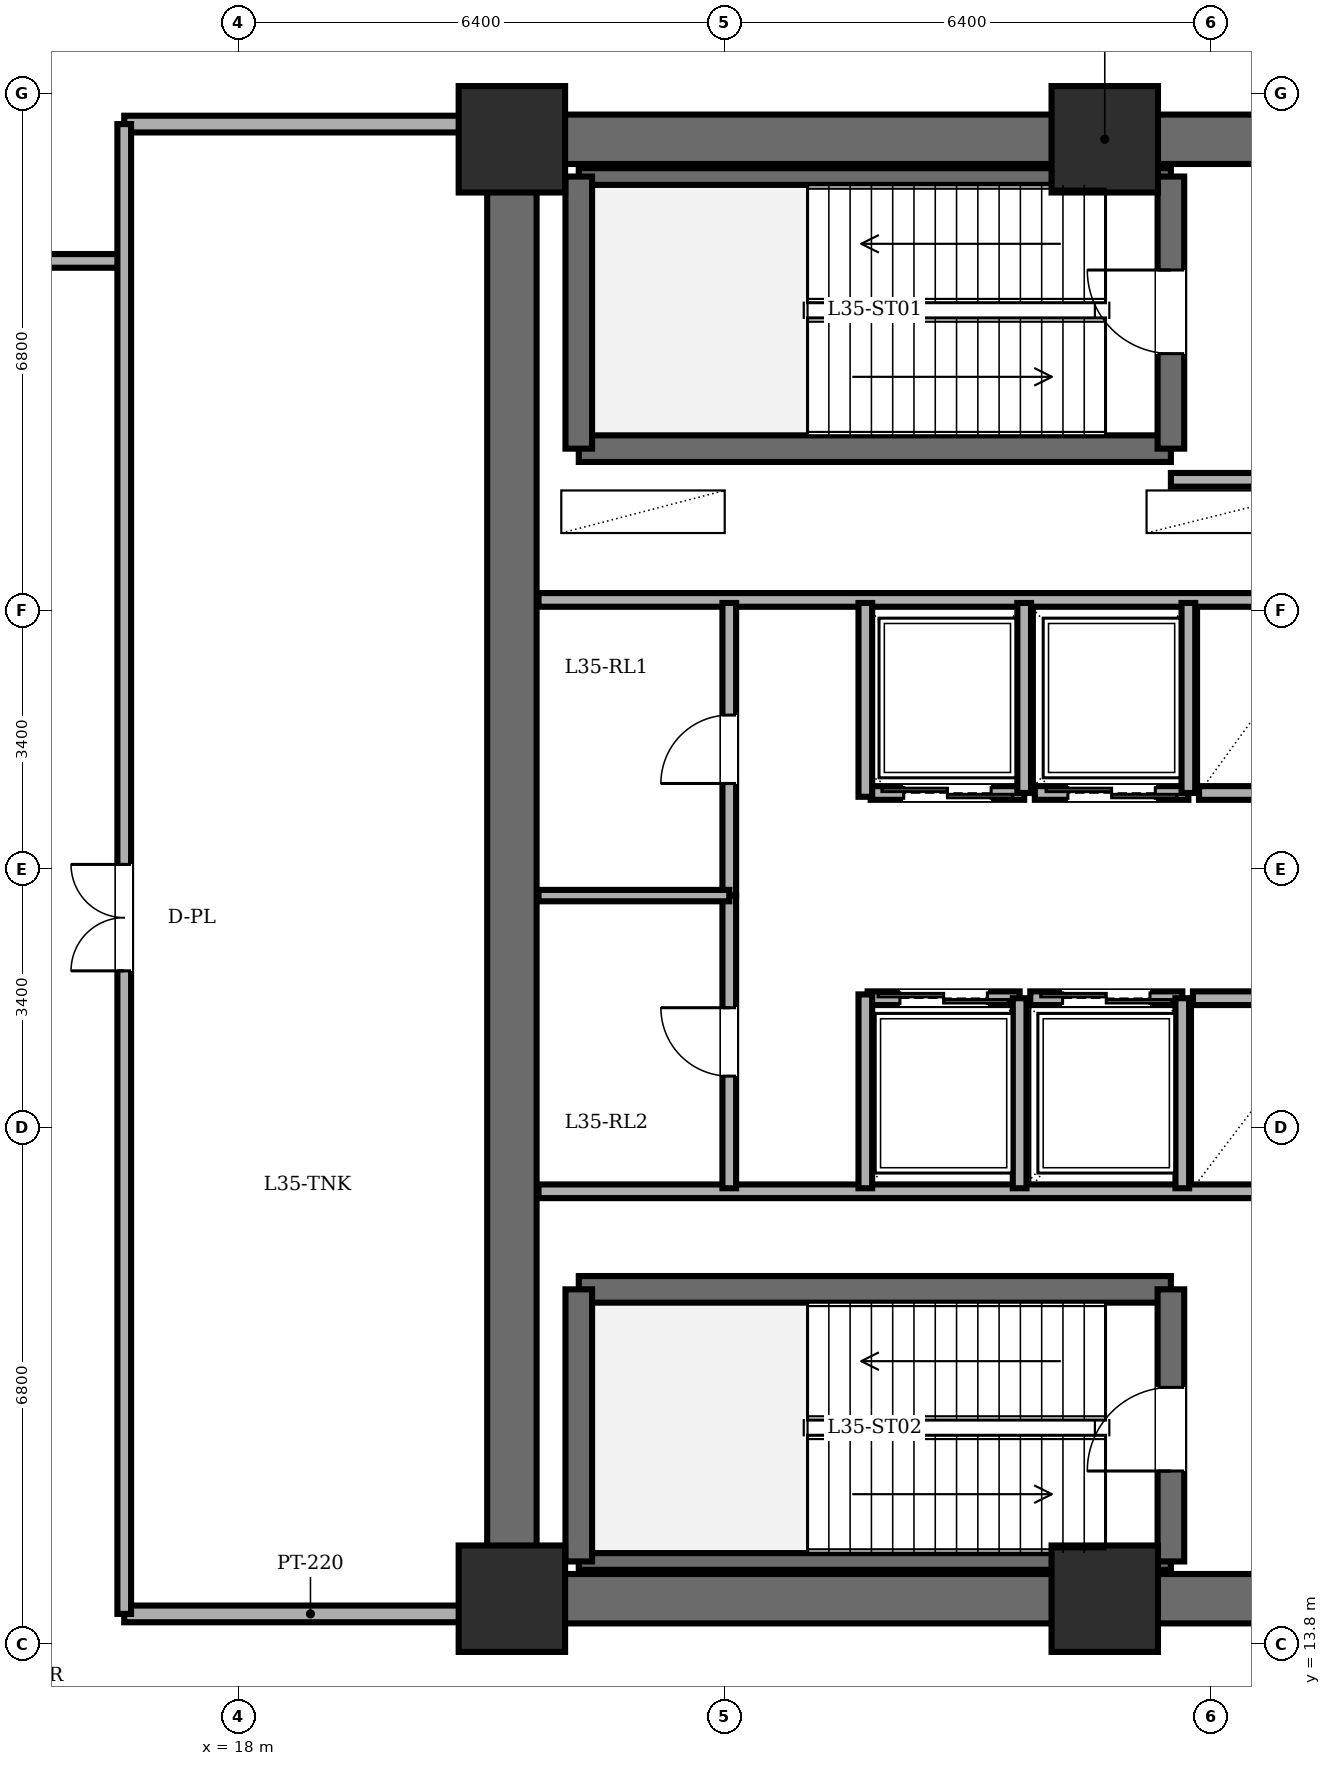
"""IFC4 building model, lengths in metres.
Left out: names, types, materials, properties, quantities, classifications, styles, units other than length and angle.
Written with IfcOpenShell. Run it as: python <this file> out.ifc"""

import sys

from ifc_helpers import new_model, si_unit, direction, frame, frame_2d, origin, origin_2d, place, context, subcontext, project, spatial, rectangle, extrude, element, fill, save


model = new_model("IFC4")
c1 = context("Model", 3, precision=1e-05, world=origin(), true_north=direction((0.0, 1.0)))
c2 = subcontext(c1, "Body", "Model", "MODEL_VIEW")
j1 = project(units=[si_unit("LENGTHUNIT", "METRE"), si_unit("PLANEANGLEUNIT", "RADIAN")], contexts=[c1])
p1 = place(None, origin())
s1 = spatial("IfcSite", under=j1, at=p1, CompositionType="ELEMENT")
p2 = place(p1, origin())
s2 = spatial("IfcBuilding", under=s1, at=p2, CompositionType="ELEMENT")
p3 = place(p2, frame((0.0, 0.0, 133.1)))
s3 = spatial("IfcBuildingStorey", under=s2, at=p3, CompositionType="ELEMENT", Elevation=133.1)
for number, where, z_axis, x_axis in (
    (1, (21.6, 14.4, 0.0), (0.0, 0.0, 1.0), (1.0, 0.0, 0.0)),
    (2, (29.4, 14.4, 0.0), (0.0, 0.0, 1.0), (1.0, 0.0, 0.0)),
    (3, (29.4, 33.6, 0.0), (0.0, 0.0, 1.0), (1.0, 0.0, 0.0)),
    (4, (21.6, 33.6, 0.0), (0.0, 0.0, 1.0), (1.0, 0.0, 0.0)),
):
    element("IfcColumn", number, at=place(p3, frame(where, z_axis=z_axis, x_axis=x_axis)), inside=s3, PredefinedType="COLUMN", context=c2, shape_type="SweptSolid", body=[
        extrude(rectangle(XDim=1.4, YDim=1.4, at=origin_2d()), origin(), (0.0, 0.0, 1.0), 5.6),
    ])
p4 = place(p3, frame((21.6, 14.4, 0.0), z_axis=(0.0, 0.0, 1.0), x_axis=(0.0, 1.0, 0.0)))
e5 = element("IfcWall", 5, at=p4, inside=s3, PredefinedType="SHEAR", context=c2, shape_type="SweptSolid", body=[
    extrude(rectangle(XDim=19.2, YDim=0.65, at=frame_2d((9.6, 0.0))), origin(), (0.0, 0.0, 1.0), 5.36),
])
for number, where, z_axis, x_axis in (
    (6, (21.6, 33.6, 0.0), (0.0, 0.0, 1.0), (1.0, 0.0, 0.0)),
    (7, (37.2, 14.4, 0.0), (0.0, 0.0, 1.0), (-1.0, 0.0, 0.0)),
):
    element("IfcWall", number, at=place(p3, frame(where, z_axis=z_axis, x_axis=x_axis)), inside=s3, PredefinedType="SHEAR", context=c2, shape_type="SweptSolid", body=[
        extrude(rectangle(XDim=15.6, YDim=0.65, at=frame_2d((7.8, 0.0))), origin(), (0.0, 0.0, 1.0), 5.36),
    ])
p5 = place(p3, frame((22.48, 29.53, 0.0), z_axis=(0.0, 0.0, 1.0), x_axis=(1.0, 0.0, 0.0)))
e8 = element("IfcWall", 8, at=p5, inside=s3, PredefinedType="SOLIDWALL", context=c2, shape_type="SweptSolid", body=[
    extrude(rectangle(XDim=7.79, YDim=0.35, at=frame_2d((3.895, 0.0))), origin(), (0.0, 0.0, 1.0), 5.36),
])
p6 = place(p3, frame((22.48, 33.11, 0.0), z_axis=(0.0, 0.0, 1.0), x_axis=(1.0, 0.0, 0.0)))
e9 = element("IfcWall", 9, at=p6, inside=s3, PredefinedType="PARTITIONING", context=c2, shape_type="SweptSolid", body=[
    extrude(rectangle(XDim=7.79, YDim=0.22, at=frame_2d((3.895, 0.0))), origin(), (0.0, 0.0, 1.0), 5.36),
])
p7 = place(p3, frame((22.48, 29.53, 0.0), z_axis=(0.0, 0.0, 1.0), x_axis=(0.0, 1.0, 0.0)))
e10 = element("IfcWall", 10, at=p7, inside=s3, PredefinedType="SOLIDWALL", context=c2, shape_type="SweptSolid", body=[
    extrude(rectangle(XDim=3.58, YDim=0.35, at=frame_2d((1.79, 0.0))), origin(), (0.0, 0.0, 1.0), 5.36),
])
p8 = place(p3, frame((30.27, 29.53, 0.0), z_axis=(0.0, 0.0, 1.0), x_axis=(0.0, 1.0, 0.0)))
e11 = element("IfcWall", 11, at=p8, inside=s3, PredefinedType="SOLIDWALL", context=c2, shape_type="SweptSolid", body=[
    extrude(rectangle(XDim=3.58, YDim=0.35, at=frame_2d((1.79, 0.0))), origin(), (0.0, 0.0, 1.0), 5.36),
])
p9 = place(p8, frame((1.25, 0.0, 0.0)))
e12 = element("IfcOpeningElement", 12, at=p9, cuts=e11, PredefinedType="OPENING", context=c2, shape_type="SweptSolid", body=[
    extrude(rectangle(XDim=1.1, YDim=2.15, at=frame_2d((0.55, 1.075))), frame((0.0, 0.185, 0.0), z_axis=(0.0, -1.0, 0.0), x_axis=(1.0, 0.0, 0.0)), (0.0, 0.0, 1.0), 0.37),
])
p10 = place(p3, frame((22.48, 18.47, 0.0), z_axis=(0.0, 0.0, 1.0), x_axis=(1.0, 0.0, 0.0)))
e13 = element("IfcWall", 13, at=p10, inside=s3, PredefinedType="SOLIDWALL", context=c2, shape_type="SweptSolid", body=[
    extrude(rectangle(XDim=7.79, YDim=0.35, at=frame_2d((3.895, 0.0))), origin(), (0.0, 0.0, 1.0), 5.36),
])
p11 = place(p3, frame((22.48, 14.89, 0.0), z_axis=(0.0, 0.0, 1.0), x_axis=(1.0, 0.0, 0.0)))
e14 = element("IfcWall", 14, at=p11, inside=s3, PredefinedType="PARTITIONING", context=c2, shape_type="SweptSolid", body=[
    extrude(rectangle(XDim=7.79, YDim=0.22, at=frame_2d((3.895, 0.0))), origin(), (0.0, 0.0, 1.0), 5.36),
])
p12 = place(p3, frame((22.48, 14.89, 0.0), z_axis=(0.0, 0.0, 1.0), x_axis=(0.0, 1.0, 0.0)))
e15 = element("IfcWall", 15, at=p12, inside=s3, PredefinedType="SOLIDWALL", context=c2, shape_type="SweptSolid", body=[
    extrude(rectangle(XDim=3.58, YDim=0.35, at=frame_2d((1.79, 0.0))), origin(), (0.0, 0.0, 1.0), 5.36),
])
p13 = place(p3, frame((30.27, 14.89, 0.0), z_axis=(0.0, 0.0, 1.0), x_axis=(0.0, 1.0, 0.0)))
e16 = element("IfcWall", 16, at=p13, inside=s3, PredefinedType="SOLIDWALL", context=c2, shape_type="SweptSolid", body=[
    extrude(rectangle(XDim=3.58, YDim=0.35, at=frame_2d((1.79, 0.0))), origin(), (0.0, 0.0, 1.0), 5.36),
])
p14 = place(p13, frame((1.19, 0.0, 0.0)))
e17 = element("IfcOpeningElement", 17, at=p14, cuts=e16, PredefinedType="OPENING", context=c2, shape_type="SweptSolid", body=[
    extrude(rectangle(XDim=1.1, YDim=2.15, at=frame_2d((0.55, 1.075))), frame((0.0, 0.185, 0.0), z_axis=(0.0, -1.0, 0.0), x_axis=(1.0, 0.0, 0.0)), (0.0, 0.0, 1.0), 0.37),
])
p15 = place(p3, frame((30.27, 29.12, 0.0), z_axis=(0.0, 0.0, 1.0), x_axis=(1.0, 0.0, 0.0)))
e18 = element("IfcWall", 18, at=p15, inside=s3, PredefinedType="PARTITIONING", context=c2, shape_type="SweptSolid", body=[
    extrude(rectangle(XDim=2.24, YDim=0.18, at=frame_2d((1.12, 0.0))), origin(), (0.0, 0.0, 1.0), 5.36),
])
p16 = place(p3, frame((21.95, 27.54, 0.0), z_axis=(0.0, 0.0, 1.0), x_axis=(1.0, 0.0, 0.0)))
e19 = element("IfcWall", 19, at=p16, inside=s3, PredefinedType="PARTITIONING", context=c2, shape_type="SweptSolid", body=[
    extrude(rectangle(XDim=10.56, YDim=0.18, at=frame_2d((5.28, 0.0))), origin(), (0.0, 0.0, 1.0), 5.36),
])
p17 = place(p3, frame((21.95, 19.76, 0.0), z_axis=(0.0, 0.0, 1.0), x_axis=(1.0, 0.0, 0.0)))
e20 = element("IfcWall", 20, at=p17, inside=s3, PredefinedType="PARTITIONING", context=c2, shape_type="SweptSolid", body=[
    extrude(rectangle(XDim=14.87, YDim=0.18, at=frame_2d((7.435, 0.0))), origin(), (0.0, 0.0, 1.0), 5.36),
])
p18 = place(p3, frame((28.34, 25.0, 0.0), z_axis=(0.0, 0.0, 1.0), x_axis=(-1.0, 0.0, 0.0)))
e21 = element("IfcWall", 21, at=p18, inside=s3, PredefinedType="PARTITIONING", context=c2, shape_type="SweptSolid", body=[
    extrude(rectangle(XDim=2.02, YDim=0.18, at=frame_2d((1.01, 0.0))), origin(), (0.0, 0.0, 1.0), 5.36),
])
p19 = place(p18, frame((0.435, 0.0, 0.0)))
e22 = element("IfcOpeningElement", 22, at=p19, cuts=e21, PredefinedType="OPENING", context=c2, shape_type="SweptSolid", body=[
    extrude(rectangle(XDim=1.15, YDim=2.2, at=frame_2d((0.575, 1.1))), frame((0.0, 0.1, 0.0), z_axis=(0.0, -1.0, 0.0), x_axis=(1.0, 0.0, 0.0)), (0.0, 0.0, 1.0), 0.2),
])
p20 = place(p3, frame((28.34, 25.0, 0.0), z_axis=(0.0, 0.0, 1.0), x_axis=(0.0, 1.0, 0.0)))
e23 = element("IfcWall", 23, at=p20, inside=s3, PredefinedType="PARTITIONING", context=c2, shape_type="SweptSolid", body=[
    extrude(rectangle(XDim=2.5, YDim=0.18, at=frame_2d((1.25, 0.0))), origin(), (0.0, 0.0, 1.0), 5.36),
])
p21 = place(p3, frame((30.5, 25.0, 0.0), z_axis=(0.0, 0.0, 1.0), x_axis=(-1.0, 0.0, 0.0)))
e24 = element("IfcWall", 24, at=p21, inside=s3, PredefinedType="PARTITIONING", context=c2, shape_type="SweptSolid", body=[
    extrude(rectangle(XDim=2.02, YDim=0.18, at=frame_2d((1.01, 0.0))), origin(), (0.0, 0.0, 1.0), 5.36),
])
p22 = place(p21, frame((0.435, 0.0, 0.0)))
e25 = element("IfcOpeningElement", 25, at=p22, cuts=e24, PredefinedType="OPENING", context=c2, shape_type="SweptSolid", body=[
    extrude(rectangle(XDim=1.15, YDim=2.2, at=frame_2d((0.575, 1.1))), frame((0.0, 0.1, 0.0), z_axis=(0.0, -1.0, 0.0), x_axis=(1.0, 0.0, 0.0)), (0.0, 0.0, 1.0), 0.2),
])
p23 = place(p3, frame((30.5, 25.0, 0.0), z_axis=(0.0, 0.0, 1.0), x_axis=(0.0, 1.0, 0.0)))
e26 = element("IfcWall", 26, at=p23, inside=s3, PredefinedType="PARTITIONING", context=c2, shape_type="SweptSolid", body=[
    extrude(rectangle(XDim=2.5, YDim=0.18, at=frame_2d((1.25, 0.0))), origin(), (0.0, 0.0, 1.0), 5.36),
])
p24 = place(p3, frame((26.28, 22.3, 0.0), z_axis=(0.0, 0.0, 1.0), x_axis=(1.0, 0.0, 0.0)))
e27 = element("IfcWall", 27, at=p24, inside=s3, PredefinedType="PARTITIONING", context=c2, shape_type="SweptSolid", body=[
    extrude(rectangle(XDim=2.0, YDim=0.18, at=frame_2d((1.0, 0.0))), origin(), (0.0, 0.0, 1.0), 5.36),
])
p25 = place(p24, frame((0.425, 0.0, 0.0)))
e28 = element("IfcOpeningElement", 28, at=p25, cuts=e27, PredefinedType="OPENING", context=c2, shape_type="SweptSolid", body=[
    extrude(rectangle(XDim=1.15, YDim=2.2, at=frame_2d((0.575, 1.1))), frame((0.0, 0.1, 0.0), z_axis=(0.0, -1.0, 0.0), x_axis=(1.0, 0.0, 0.0)), (0.0, 0.0, 1.0), 0.2),
])
p26 = place(p3, frame((28.28, 19.8, 0.0), z_axis=(0.0, 0.0, 1.0), x_axis=(0.0, 1.0, 0.0)))
e29 = element("IfcWall", 29, at=p26, inside=s3, PredefinedType="PARTITIONING", context=c2, shape_type="SweptSolid", body=[
    extrude(rectangle(XDim=2.5, YDim=0.18, at=frame_2d((1.25, 0.0))), origin(), (0.0, 0.0, 1.0), 5.36),
])
p27 = place(p3, frame((28.42, 22.3, 0.0), z_axis=(0.0, 0.0, 1.0), x_axis=(1.0, 0.0, 0.0)))
e30 = element("IfcWall", 30, at=p27, inside=s3, PredefinedType="PARTITIONING", context=c2, shape_type="SweptSolid", body=[
    extrude(rectangle(XDim=2.0, YDim=0.18, at=frame_2d((1.0, 0.0))), origin(), (0.0, 0.0, 1.0), 5.36),
])
p28 = place(p27, frame((0.425, 0.0, 0.0)))
e31 = element("IfcOpeningElement", 31, at=p28, cuts=e30, PredefinedType="OPENING", context=c2, shape_type="SweptSolid", body=[
    extrude(rectangle(XDim=1.15, YDim=2.2, at=frame_2d((0.575, 1.1))), frame((0.0, 0.1, 0.0), z_axis=(0.0, -1.0, 0.0), x_axis=(1.0, 0.0, 0.0)), (0.0, 0.0, 1.0), 0.2),
])
p29 = place(p3, frame((30.42, 19.8, 0.0), z_axis=(0.0, 0.0, 1.0), x_axis=(0.0, 1.0, 0.0)))
e32 = element("IfcWall", 32, at=p29, inside=s3, PredefinedType="PARTITIONING", context=c2, shape_type="SweptSolid", body=[
    extrude(rectangle(XDim=2.5, YDim=0.18, at=frame_2d((1.25, 0.0))), origin(), (0.0, 0.0, 1.0), 5.36),
])
p30 = place(p3, frame((32.46, 25.0, 0.0), z_axis=(0.0, 0.0, 1.0), x_axis=(-1.0, 0.0, 0.0)))
e33 = element("IfcWall", 33, at=p30, inside=s3, PredefinedType="PARTITIONING", context=c2, shape_type="SweptSolid", body=[
    extrude(rectangle(XDim=1.82, YDim=0.18, at=frame_2d((0.91, 0.0))), origin(), (0.0, 0.0, 1.0), 5.36),
])
p31 = place(p3, frame((30.56, 22.3, 0.0), z_axis=(0.0, 0.0, 1.0), x_axis=(1.0, 0.0, 0.0)))
e34 = element("IfcWall", 34, at=p31, inside=s3, PredefinedType="PARTITIONING", context=c2, shape_type="SweptSolid", body=[
    extrude(rectangle(XDim=1.9, YDim=0.18, at=frame_2d((0.95, 0.0))), origin(), (0.0, 0.0, 1.0), 5.36),
])
p32 = place(p3, frame((24.46, 23.65, 0.0), z_axis=(0.0, 0.0, 1.0), x_axis=(0.0, 1.0, 0.0)))
e35 = element("IfcWall", 35, at=p32, inside=s3, PredefinedType="PARTITIONING", context=c2, shape_type="SweptSolid", body=[
    extrude(rectangle(XDim=3.85, YDim=0.18, at=frame_2d((1.925, 0.0))), origin(), (0.0, 0.0, 1.0), 5.36),
])
p33 = place(p32, frame((1.475, 0.0, 0.0)))
e36 = element("IfcOpeningElement", 36, at=p33, cuts=e35, PredefinedType="OPENING", context=c2, shape_type="SweptSolid", body=[
    extrude(rectangle(XDim=0.9, YDim=2.05, at=frame_2d((0.45, 1.025))), frame((0.0, 0.1, 0.0), z_axis=(0.0, -1.0, 0.0), x_axis=(1.0, 0.0, 0.0)), (0.0, 0.0, 1.0), 0.2),
])
p34 = place(p3, frame((24.46, 19.8, 0.0), z_axis=(0.0, 0.0, 1.0), x_axis=(0.0, 1.0, 0.0)))
e37 = element("IfcWall", 37, at=p34, inside=s3, PredefinedType="PARTITIONING", context=c2, shape_type="SweptSolid", body=[
    extrude(rectangle(XDim=3.85, YDim=0.18, at=frame_2d((1.925, 0.0))), origin(), (0.0, 0.0, 1.0), 5.36),
])
p35 = place(p34, frame((1.475, 0.0, 0.0)))
e38 = element("IfcOpeningElement", 38, at=p35, cuts=e37, PredefinedType="OPENING", context=c2, shape_type="SweptSolid", body=[
    extrude(rectangle(XDim=0.9, YDim=2.05, at=frame_2d((0.45, 1.025))), frame((0.0, 0.1, 0.0), z_axis=(0.0, -1.0, 0.0), x_axis=(1.0, 0.0, 0.0)), (0.0, 0.0, 1.0), 0.2),
])
p36 = place(p3, frame((21.95, 23.65, 0.0), z_axis=(0.0, 0.0, 1.0), x_axis=(1.0, 0.0, 0.0)))
e39 = element("IfcWall", 39, at=p36, inside=s3, PredefinedType="PARTITIONING", context=c2, shape_type="SweptSolid", body=[
    extrude(rectangle(XDim=2.51, YDim=0.15, at=frame_2d((1.255, 0.0))), origin(), (0.0, 0.0, 1.0), 5.36),
])
for number, where, z_axis, x_axis in (
    (40, (26.25, 24.95, 0.0), (0.0, 0.0, 1.0), (0.0, 1.0, 0.0)),
    (41, (26.25, 19.8, 0.0), (0.0, 0.0, 1.0), (0.0, 1.0, 0.0)),
):
    element("IfcWall", number, at=place(p3, frame(where, z_axis=z_axis, x_axis=x_axis)), inside=s3, PredefinedType="PARTITIONING", context=c2, shape_type="SweptSolid", body=[
        extrude(rectangle(XDim=2.55, YDim=0.18, at=frame_2d((1.275, 0.0))), origin(), (0.0, 0.0, 1.0), 5.36),
    ])
p37 = place(p3, frame((16.5, 14.2, 0.0), z_axis=(0.0, 0.0, 1.0), x_axis=(1.0, 0.0, 0.0)))
e42 = element("IfcWall", 42, at=p37, inside=s3, PredefinedType="PARTITIONING", context=c2, shape_type="SweptSolid", body=[
    extrude(rectangle(XDim=4.9, YDim=0.22, at=frame_2d((2.45, 0.0))), origin(), (0.0, 0.0, 1.0), 5.36),
])
p38 = place(p3, frame((13.5, 32.0, 0.0), z_axis=(0.0, 0.0, 1.0), x_axis=(1.0, 0.0, 0.0)))
e43 = element("IfcWall", 43, at=p38, inside=s3, PredefinedType="PARTITIONING", context=c2, shape_type="SweptSolid", body=[
    extrude(rectangle(XDim=3.0, YDim=0.18, at=frame_2d((1.5, 0.0))), origin(), (0.0, 0.0, 1.0), 5.36),
])
p39 = place(p3, frame((16.5, 33.8, 0.0), z_axis=(0.0, 0.0, 1.0), x_axis=(1.0, 0.0, 0.0)))
e44 = element("IfcWall", 44, at=p39, inside=s3, PredefinedType="PARTITIONING", context=c2, shape_type="SweptSolid", body=[
    extrude(rectangle(XDim=4.9, YDim=0.22, at=frame_2d((2.45, 0.0))), origin(), (0.0, 0.0, 1.0), 5.36),
])
p40 = place(p3, frame((16.5, 14.2, 0.0), z_axis=(0.0, 0.0, 1.0), x_axis=(0.0, 1.0, 0.0)))
e45 = element("IfcWall", 45, at=p40, inside=s3, PredefinedType="PARTITIONING", context=c2, shape_type="SweptSolid", body=[
    extrude(rectangle(XDim=19.6, YDim=0.18, at=frame_2d((9.8, 0.0))), origin(), (0.0, 0.0, 1.0), 5.36),
])
p41 = place(p40, frame((8.46, 0.0, 0.0)))
e46 = element("IfcOpeningElement", 46, at=p41, cuts=e45, PredefinedType="OPENING", context=c2, shape_type="SweptSolid", body=[
    extrude(rectangle(XDim=1.4, YDim=2.25, at=frame_2d((0.7, 1.125))), frame((0.0, 0.1, 0.0), z_axis=(0.0, -1.0, 0.0), x_axis=(1.0, 0.0, 0.0)), (0.0, 0.0, 1.0), 0.2),
])
p42 = place(p9, origin())
e47 = element("IfcDoor", 47, at=p42, inside=s3, OperationType="SINGLE_SWING_RIGHT", PredefinedType="DOOR", context=c2, shape_type="SweptSolid", body=[
    extrude(rectangle(XDim=1.1, YDim=2.15, at=frame_2d((0.55, 1.075))), frame((0.0, 0.025, 0.0), z_axis=(0.0, -1.0, 0.0), x_axis=(1.0, 0.0, 0.0)), (0.0, 0.0, 1.0), 0.05),
])
fill(e12, e47)
p43 = place(p14, origin())
e48 = element("IfcDoor", 48, at=p43, inside=s3, OperationType="SINGLE_SWING_LEFT", PredefinedType="DOOR", context=c2, shape_type="SweptSolid", body=[
    extrude(rectangle(XDim=1.1, YDim=2.15, at=frame_2d((0.55, 1.075))), frame((0.0, 0.025, 0.0), z_axis=(0.0, -1.0, 0.0), x_axis=(1.0, 0.0, 0.0)), (0.0, 0.0, 1.0), 0.05),
])
fill(e17, e48)
p44 = place(p19, origin())
e49 = element("IfcDoor", 49, at=p44, inside=s3, OperationType="DOUBLE_DOOR_SLIDING", PredefinedType="DOOR", context=c2, shape_type="SweptSolid", body=[
    extrude(rectangle(XDim=1.15, YDim=2.2, at=frame_2d((0.575, 1.1))), frame((0.0, 0.025, 0.0), z_axis=(0.0, -1.0, 0.0), x_axis=(1.0, 0.0, 0.0)), (0.0, 0.0, 1.0), 0.05),
])
fill(e22, e49)
p45 = place(p22, origin())
e50 = element("IfcDoor", 50, at=p45, inside=s3, OperationType="DOUBLE_DOOR_SLIDING", PredefinedType="DOOR", context=c2, shape_type="SweptSolid", body=[
    extrude(rectangle(XDim=1.15, YDim=2.2, at=frame_2d((0.575, 1.1))), frame((0.0, 0.025, 0.0), z_axis=(0.0, -1.0, 0.0), x_axis=(1.0, 0.0, 0.0)), (0.0, 0.0, 1.0), 0.05),
])
fill(e25, e50)
p46 = place(p25, origin())
e51 = element("IfcDoor", 51, at=p46, inside=s3, OperationType="DOUBLE_DOOR_SLIDING", PredefinedType="DOOR", context=c2, shape_type="SweptSolid", body=[
    extrude(rectangle(XDim=1.15, YDim=2.2, at=frame_2d((0.575, 1.1))), frame((0.0, 0.025, 0.0), z_axis=(0.0, -1.0, 0.0), x_axis=(1.0, 0.0, 0.0)), (0.0, 0.0, 1.0), 0.05),
])
fill(e28, e51)
p47 = place(p28, origin())
e52 = element("IfcDoor", 52, at=p47, inside=s3, OperationType="DOUBLE_DOOR_SLIDING", PredefinedType="DOOR", context=c2, shape_type="SweptSolid", body=[
    extrude(rectangle(XDim=1.15, YDim=2.2, at=frame_2d((0.575, 1.1))), frame((0.0, 0.025, 0.0), z_axis=(0.0, -1.0, 0.0), x_axis=(1.0, 0.0, 0.0)), (0.0, 0.0, 1.0), 0.05),
])
fill(e31, e52)
p48 = place(p33, origin())
e53 = element("IfcDoor", 53, at=p48, inside=s3, OperationType="SINGLE_SWING_LEFT", PredefinedType="DOOR", context=c2, shape_type="SweptSolid", body=[
    extrude(rectangle(XDim=0.9, YDim=2.05, at=frame_2d((0.45, 1.025))), frame((0.0, 0.025, 0.0), z_axis=(0.0, -1.0, 0.0), x_axis=(1.0, 0.0, 0.0)), (0.0, 0.0, 1.0), 0.05),
])
fill(e36, e53)
p49 = place(p35, origin())
e54 = element("IfcDoor", 54, at=p49, inside=s3, OperationType="SINGLE_SWING_RIGHT", PredefinedType="DOOR", context=c2, shape_type="SweptSolid", body=[
    extrude(rectangle(XDim=0.9, YDim=2.05, at=frame_2d((0.45, 1.025))), frame((0.0, 0.025, 0.0), z_axis=(0.0, -1.0, 0.0), x_axis=(1.0, 0.0, 0.0)), (0.0, 0.0, 1.0), 0.05),
])
fill(e38, e54)
p50 = place(p41, origin())
e55 = element("IfcDoor", 55, at=p50, inside=s3, OperationType="DOUBLE_DOOR_SINGLE_SWING", PredefinedType="DOOR", context=c2, shape_type="SweptSolid", body=[
    extrude(rectangle(XDim=1.4, YDim=2.25, at=frame_2d((0.7, 1.125))), frame((0.0, 0.025, 0.0), z_axis=(0.0, -1.0, 0.0), x_axis=(1.0, 0.0, 0.0)), (0.0, 0.0, 1.0), 0.05),
])
fill(e46, e55)
save(model, sys.argv[1])
